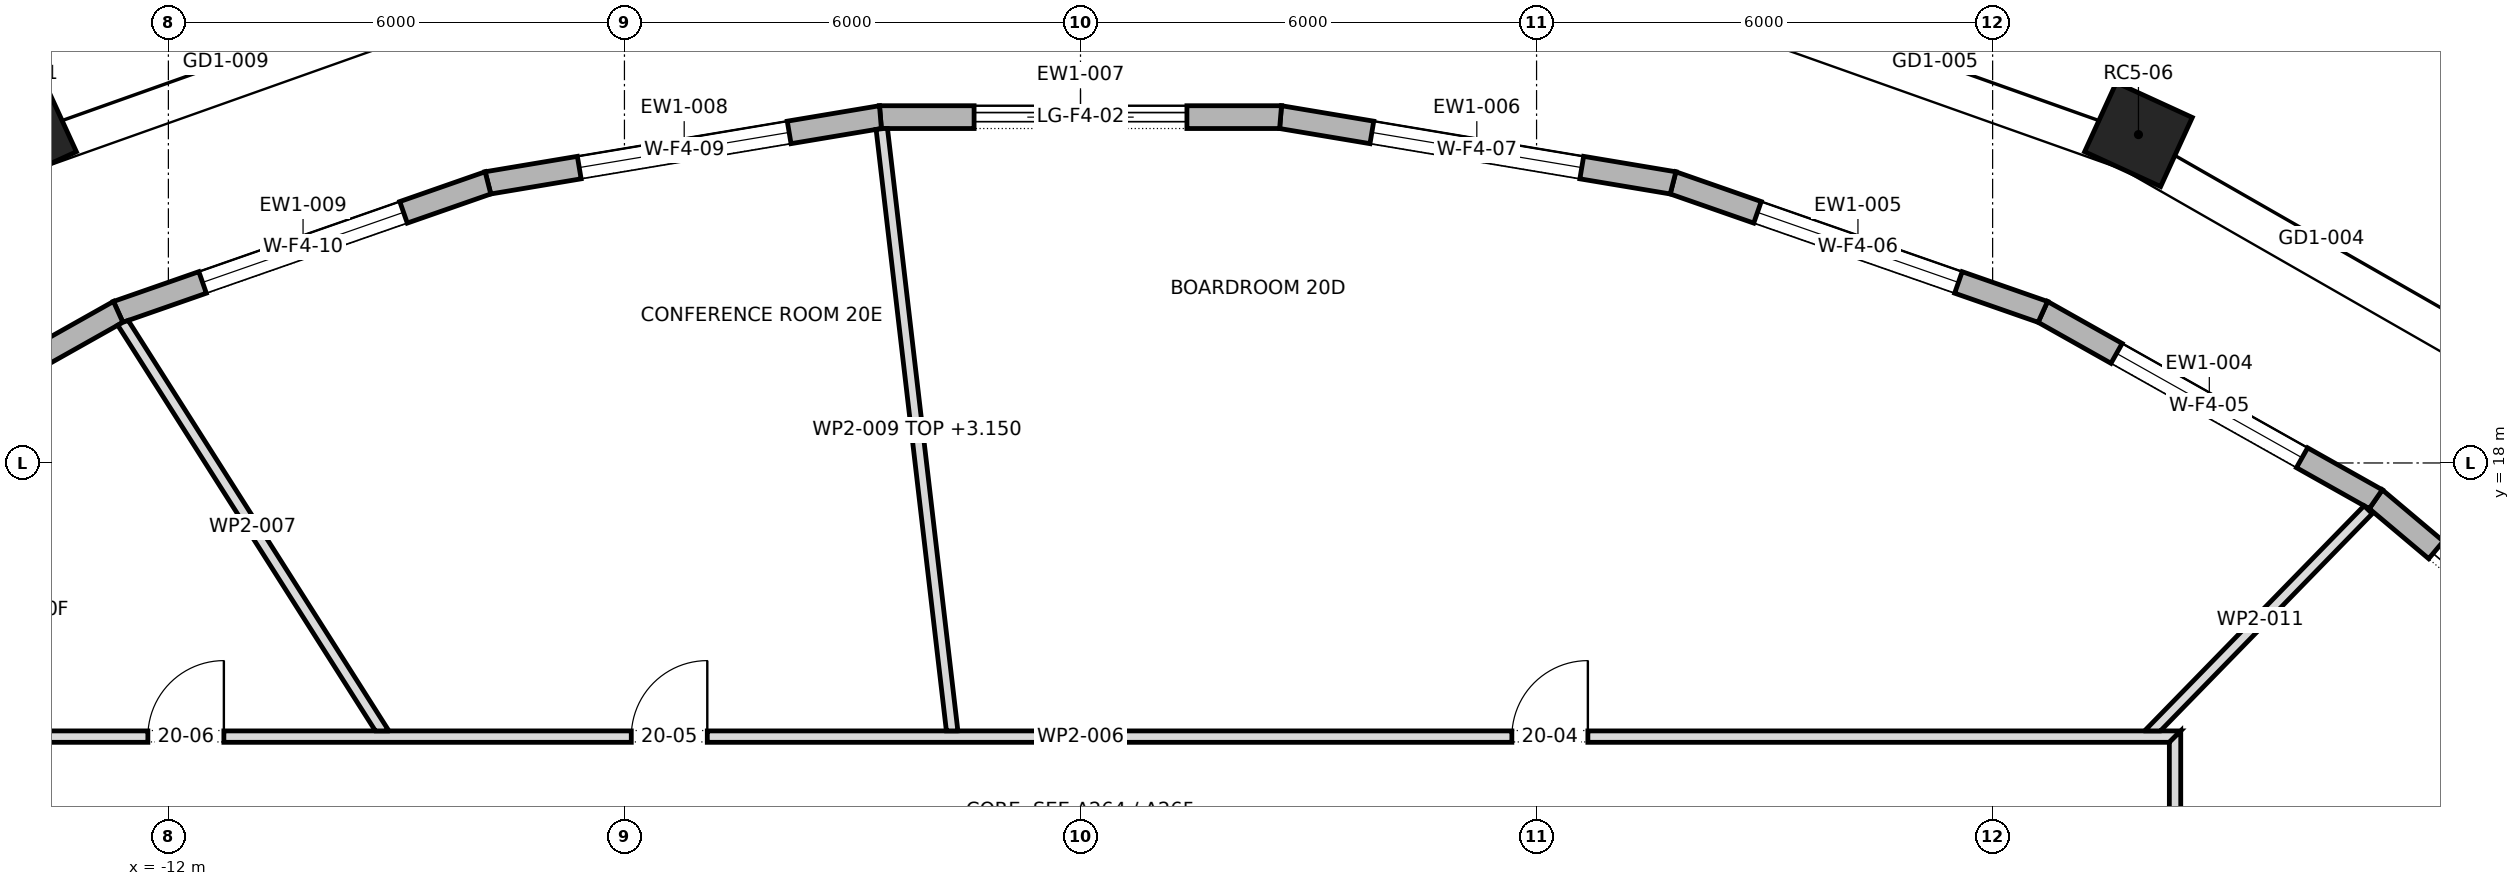
"""IFC4 building model, lengths in metres.
Left out: names, types, materials, properties, quantities, classifications, styles, units other than length and angle.
Written with IfcOpenShell. Run it as: python <this file> out.ifc"""

import sys

from ifc_helpers import new_model, si_unit, direction, frame, frame_2d, origin, origin_2d, place, context, subcontext, project, spatial, polyline, rectangle, outline, extrude, element, fill, save


model = new_model("IFC4")
c1 = context("Model", 3, precision=1e-05, world=origin(), true_north=direction((0.0, 1.0)))
c2 = subcontext(c1, "Body", "Model", "MODEL_VIEW")
j1 = project(units=[si_unit("LENGTHUNIT", "METRE"), si_unit("PLANEANGLEUNIT", "RADIAN")], contexts=[c1])
p1 = place(None, origin())
s1 = spatial("IfcSite", under=j1, at=p1, CompositionType="ELEMENT")
p2 = place(p1, origin())
s2 = spatial("IfcBuilding", under=s1, at=p2, CompositionType="ELEMENT")
p3 = place(p2, frame((0.0, 0.0, 280.3)))
s3 = spatial("IfcBuildingStorey", under=s2, at=p3, CompositionType="ELEMENT", Elevation=280.3)
for number, where, z_axis, x_axis in (
    (1, (13.919, 22.32, 0.0), (0.0, 0.0, 1.0), (-0.909, 0.417, 0.0)),
    (2, (-13.919, 22.32, 0.0), (0.0, 0.0, 1.0), (-0.909, -0.417, 0.0)),
):
    element("IfcColumn", number, at=place(p3, frame(where, z_axis=z_axis, x_axis=x_axis)), inside=s3, PredefinedType="COLUMN", context=c2, shape_type="SweptSolid", body=[
        extrude(rectangle(XDim=1.1, YDim=1.0, at=origin_2d()), origin(), (0.0, 0.0, 1.0), 4.0),
    ])
p4 = place(p3, frame((20.768, 14.384, 0.0), z_axis=(0.0, 0.0, 1.0), x_axis=(-0.764876116592, 0.644177402792, 0.0)))
e3 = element("IfcWall", 3, at=p4, inside=s3, PredefinedType="STANDARD", context=c2, shape_type="SweptSolid", body=[
    extrude(outline(polyline([(-0.015, -0.15), (4.887, -0.15), (4.859, 0.15), (0.015, 0.15), (-0.015, -0.15)])), origin(), (0.0, 0.0, 1.0), 3.7),
])
p5 = place(p4, frame((1.036, 0.0, 0.0)))
e4 = element("IfcOpeningElement", 4, at=p5, cuts=e3, PredefinedType="OPENING", context=c2, shape_type="SweptSolid", body=[
    extrude(rectangle(XDim=2.8, YDim=3.25, at=frame_2d((1.4, 1.625))), frame((0.0, 0.162, 0.0), z_axis=(0.0, -1.0, 0.0), x_axis=(1.0, 0.0, 0.0)), (0.0, 0.0, 1.0), 0.324),
])
p6 = place(p3, frame((17.041, 17.523, 0.0), z_axis=(0.0, 0.0, 1.0), x_axis=(-0.871488606878, 0.490415750239, 0.0)))
e5 = element("IfcWall", 5, at=p6, inside=s3, PredefinedType="STANDARD", context=c2, shape_type="SweptSolid", body=[
    extrude(outline(polyline([(-0.014, -0.15), (5.039, -0.15), (5.013, 0.15), (0.014, 0.15), (-0.014, -0.15)])), origin(), (0.0, 0.0, 1.0), 3.7),
])
p7 = place(p6, frame((1.113, 0.0, 0.6)))
e6 = element("IfcOpeningElement", 6, at=p7, cuts=e5, PredefinedType="OPENING", context=c2, shape_type="SweptSolid", body=[
    extrude(rectangle(XDim=2.8, YDim=2.65, at=frame_2d((1.4, 1.325))), frame((0.0, 0.162, 0.0), z_axis=(0.0, -1.0, 0.0), x_axis=(1.0, 0.0, 0.0)), (0.0, 0.0, 1.0), 0.324),
])
p8 = place(p3, frame((12.661, 19.988, 0.0), z_axis=(0.0, 0.0, 1.0), x_axis=(-0.944204293701, 0.329360367617, 0.0)))
e7 = element("IfcWall", 7, at=p8, inside=s3, PredefinedType="STANDARD", context=c2, shape_type="SweptSolid", body=[
    extrude(outline(polyline([(-0.013, -0.15), (5.165, -0.15), (5.14, 0.15), (0.013, 0.15), (-0.013, -0.15)])), origin(), (0.0, 0.0, 1.0), 3.7),
])
p9 = place(p8, frame((1.176, 0.0, 0.6)))
e8 = element("IfcOpeningElement", 8, at=p9, cuts=e7, PredefinedType="OPENING", context=c2, shape_type="SweptSolid", body=[
    extrude(rectangle(XDim=2.8, YDim=2.65, at=frame_2d((1.4, 1.325))), frame((0.0, 0.162, 0.0), z_axis=(0.0, -1.0, 0.0), x_axis=(1.0, 0.0, 0.0)), (0.0, 0.0, 1.0), 0.324),
])
p10 = place(p3, frame((7.796, 21.685, 0.0), z_axis=(0.0, 0.0, 1.0), x_axis=(-0.986257472007, 0.165215613396, 0.0)))
e9 = element("IfcWall", 9, at=p10, inside=s3, PredefinedType="STANDARD", context=c2, shape_type="SweptSolid", body=[
    extrude(outline(polyline([(-0.013, -0.15), (5.248, -0.15), (5.223, 0.15), (0.013, 0.15), (-0.013, -0.15)])), origin(), (0.0, 0.0, 1.0), 3.7),
])
p11 = place(p10, frame((1.218, 0.0, 0.6)))
e10 = element("IfcOpeningElement", 10, at=p11, cuts=e9, PredefinedType="OPENING", context=c2, shape_type="SweptSolid", body=[
    extrude(rectangle(XDim=2.8, YDim=2.65, at=frame_2d((1.4, 1.325))), frame((0.0, 0.162, 0.0), z_axis=(0.0, -1.0, 0.0), x_axis=(1.0, 0.0, 0.0)), (0.0, 0.0, 1.0), 0.324),
])
p12 = place(p3, frame((2.632, 22.55, 0.0), z_axis=(0.0, 0.0, 1.0), x_axis=(-1.0, 0.0, 0.0)))
e11 = element("IfcWall", 11, at=p12, inside=s3, PredefinedType="STANDARD", context=c2, shape_type="SweptSolid", body=[
    extrude(outline(polyline([(-0.012, -0.15), (5.277, -0.15), (5.252, 0.15), (0.012, 0.15), (-0.012, -0.15)])), origin(), (0.0, 0.0, 1.0), 3.7),
])
p13 = place(p12, frame((1.232, 0.0, 0.0)))
e12 = element("IfcOpeningElement", 12, at=p13, cuts=e11, PredefinedType="OPENING", context=c2, shape_type="SweptSolid", body=[
    extrude(rectangle(XDim=2.8, YDim=3.25, at=frame_2d((1.4, 1.625))), frame((0.0, 0.162, 0.0), z_axis=(0.0, -1.0, 0.0), x_axis=(1.0, 0.0, 0.0)), (0.0, 0.0, 1.0), 0.324),
])
p14 = place(p3, frame((-2.632, 22.55, 0.0), z_axis=(0.0, 0.0, 1.0), x_axis=(-0.986257472007, -0.165215613396, 0.0)))
e13 = element("IfcWall", 13, at=p14, inside=s3, PredefinedType="STANDARD", context=c2, shape_type="SweptSolid", body=[
    extrude(outline(polyline([(-0.012, -0.15), (5.248, -0.15), (5.223, 0.15), (0.012, 0.15), (-0.012, -0.15)])), origin(), (0.0, 0.0, 1.0), 3.7),
])
p15 = place(p14, frame((1.218, 0.0, 0.6)))
e14 = element("IfcOpeningElement", 14, at=p15, cuts=e13, PredefinedType="OPENING", context=c2, shape_type="SweptSolid", body=[
    extrude(rectangle(XDim=2.8, YDim=2.65, at=frame_2d((1.4, 1.325))), frame((0.0, 0.162, 0.0), z_axis=(0.0, -1.0, 0.0), x_axis=(1.0, 0.0, 0.0)), (0.0, 0.0, 1.0), 0.324),
])
p16 = place(p3, frame((-7.796, 21.685, 0.0), z_axis=(0.0, 0.0, 1.0), x_axis=(-0.944204293701, -0.329360367617, 0.0)))
e15 = element("IfcWall", 15, at=p16, inside=s3, PredefinedType="STANDARD", context=c2, shape_type="SweptSolid", body=[
    extrude(outline(polyline([(-0.013, -0.15), (5.166, -0.15), (5.139, 0.15), (0.013, 0.15), (-0.013, -0.15)])), origin(), (0.0, 0.0, 1.0), 3.7),
])
p17 = place(p16, frame((1.176, 0.0, 0.6)))
e16 = element("IfcOpeningElement", 16, at=p17, cuts=e15, PredefinedType="OPENING", context=c2, shape_type="SweptSolid", body=[
    extrude(rectangle(XDim=2.8, YDim=2.65, at=frame_2d((1.4, 1.325))), frame((0.0, 0.162, 0.0), z_axis=(0.0, -1.0, 0.0), x_axis=(1.0, 0.0, 0.0)), (0.0, 0.0, 1.0), 0.324),
])
p18 = place(p3, frame((-12.661, 19.988, 0.0), z_axis=(0.0, 0.0, 1.0), x_axis=(-0.871488606878, -0.490415750239, 0.0)))
e17 = element("IfcWall", 17, at=p18, inside=s3, PredefinedType="STANDARD", context=c2, shape_type="SweptSolid", body=[
    extrude(outline(polyline([(-0.013, -0.15), (5.04, -0.15), (5.012, 0.15), (0.013, 0.15), (-0.013, -0.15)])), origin(), (0.0, 0.0, 1.0), 3.7),
])
p19 = place(p18, frame((1.113, 0.0, 0.6)))
e18 = element("IfcOpeningElement", 18, at=p19, cuts=e17, PredefinedType="OPENING", context=c2, shape_type="SweptSolid", body=[
    extrude(rectangle(XDim=2.8, YDim=2.65, at=frame_2d((1.4, 1.325))), frame((0.0, 0.162, 0.0), z_axis=(0.0, -1.0, 0.0), x_axis=(1.0, 0.0, 0.0)), (0.0, 0.0, 1.0), 0.324),
])
p20 = place(p3, frame((-14.475, 14.4, 0.0), z_axis=(0.0, 0.0, 1.0), x_axis=(1.0, 0.0, 0.0)))
e19 = element("IfcWall", 19, at=p20, inside=s3, PredefinedType="PARTITIONING", context=c2, shape_type="SweptSolid", body=[
    extrude(outline(polyline([(0.15, -0.075), (2.06, -0.075), (3.97, -0.075), (5.88, -0.075), (7.79, -0.075), (9.7, -0.075), (11.61, -0.075), (13.52, -0.075), (15.43, -0.075), (17.34, -0.075), (19.25, -0.075), (21.16, -0.075), (23.07, -0.075), (24.98, -0.075), (26.89, -0.075), (28.8, -0.075), (28.95, 0.075), (27.02, 0.075), (25.09, 0.075), (23.16, 0.075), (21.23, 0.075), (19.3, 0.075), (17.37, 0.075), (15.44, 0.075), (13.51, 0.075), (11.58, 0.075), (9.65, 0.075), (7.72, 0.075), (5.79, 0.075), (3.86, 0.075), (1.93, 0.075), (0.0, 0.075), (0.15, -0.075)])), origin(), (0.0, 0.0, 1.0), 3.7),
])
p21 = place(p20, frame((20.15, 0.0, 0.0)))
e20 = element("IfcOpeningElement", 20, at=p21, cuts=e19, PredefinedType="OPENING", context=c2, shape_type="SweptSolid", body=[
    extrude(rectangle(XDim=1.0, YDim=2.1, at=frame_2d((0.5, 1.05))), frame((0.0, 0.087, 0.0), z_axis=(0.0, -1.0, 0.0), x_axis=(1.0, 0.0, 0.0)), (0.0, 0.0, 1.0), 0.174),
])
p22 = place(p20, frame((8.565, 0.0, 0.0)))
e21 = element("IfcOpeningElement", 21, at=p22, cuts=e19, PredefinedType="OPENING", context=c2, shape_type="SweptSolid", body=[
    extrude(rectangle(XDim=1.0, YDim=2.1, at=frame_2d((0.5, 1.05))), frame((0.0, 0.087, 0.0), z_axis=(0.0, -1.0, 0.0), x_axis=(1.0, 0.0, 0.0)), (0.0, 0.0, 1.0), 0.174),
])
p23 = place(p20, frame((2.205, 0.0, 0.0)))
e22 = element("IfcOpeningElement", 22, at=p23, cuts=e19, PredefinedType="OPENING", context=c2, shape_type="SweptSolid", body=[
    extrude(rectangle(XDim=1.0, YDim=2.1, at=frame_2d((0.5, 1.05))), frame((0.0, 0.087, 0.0), z_axis=(0.0, -1.0, 0.0), x_axis=(1.0, 0.0, 0.0)), (0.0, 0.0, 1.0), 0.174),
])
p24 = place(p3, frame((-9.162, 14.435, 0.0), z_axis=(0.0, 0.0, 1.0), x_axis=(-0.536136809147, 0.844131104674, 0.0)))
e23 = element("IfcWall", 23, at=p24, inside=s3, PredefinedType="PARTITIONING", context=c2, shape_type="SweptSolid", body=[
    extrude(outline(polyline([(0.0, -0.075), (1.599, -0.075), (3.198, -0.075), (4.798, -0.075), (6.397, -0.075), (6.414, -0.002), (6.417, 0.066), (6.417, 0.075), (4.837, 0.075), (3.256, 0.075), (1.676, 0.075), (0.095, 0.075), (0.0, -0.074), (0.0, -0.075)])), origin(), (0.0, 0.0, 1.0), 3.7),
])
p25 = place(p3, frame((-1.688, 14.467, 0.0), z_axis=(0.0, 0.0, 1.0), x_axis=(-0.116071250105, 0.993240889663, 0.0)))
e24 = element("IfcWall", 24, at=p25, inside=s3, PredefinedType="PARTITIONING", context=c2, shape_type="SweptSolid", body=[
    extrude(outline(polyline([(0.0, -0.075), (1.995, -0.075), (3.989, -0.075), (5.984, -0.075), (7.979, -0.075), (7.984, -0.025), (7.984, 0.075), (5.993, 0.075), (4.001, 0.075), (2.009, 0.075), (0.017, 0.075), (0.0, -0.073), (0.0, -0.075)])), origin(), (0.0, 0.0, 1.0), 3.15),
])
p26 = place(p3, frame((14.052, 14.423, 0.0), z_axis=(0.0, 0.0, 1.0), x_axis=(0.698170464683, 0.715931562542, 0.0)))
e25 = element("IfcWall", 25, at=p26, inside=s3, PredefinedType="PARTITIONING", context=c2, shape_type="SweptSolid", body=[
    extrude(outline(polyline([(4.137, -0.075), (4.137, 0.075), (4.137, 0.075), (2.758, 0.075), (1.379, 0.075), (0.0, 0.075), (0.0, 0.075), (0.146, -0.075), (2.142, -0.075), (4.137, -0.075)])), origin(), (0.0, 0.0, 1.0), 3.7),
])
p27 = place(p3, frame((14.4, -14.475, 0.0), z_axis=(0.0, 0.0, 1.0), x_axis=(0.0, 1.0, 0.0)))
e26 = element("IfcWall", 26, at=p27, inside=s3, PredefinedType="PARTITIONING", context=c2, shape_type="SweptSolid", body=[
    extrude(outline(polyline([(0.0, -0.075), (1.93, -0.075), (3.86, -0.075), (5.79, -0.075), (7.72, -0.075), (9.65, -0.075), (11.58, -0.075), (13.51, -0.075), (15.44, -0.075), (17.37, -0.075), (19.3, -0.075), (21.23, -0.075), (23.16, -0.075), (25.09, -0.075), (27.02, -0.075), (28.95, -0.075), (28.8, 0.075), (26.89, 0.075), (24.98, 0.075), (23.07, 0.075), (21.16, 0.075), (19.25, 0.075), (17.34, 0.075), (15.43, 0.075), (13.52, 0.075), (11.61, 0.075), (9.7, 0.075), (7.79, 0.075), (5.88, 0.075), (3.97, 0.075), (2.06, 0.075), (0.15, 0.075), (0.0, -0.075)])), origin(), (0.0, 0.0, 1.0), 3.7),
])
p28 = place(p27, frame((3.535, 0.0, 0.0)))
e27 = element("IfcOpeningElement", 27, at=p28, cuts=e26, PredefinedType="OPENING", context=c2, shape_type="SweptSolid", body=[
    extrude(rectangle(XDim=1.0, YDim=2.1, at=frame_2d((0.5, 1.05))), frame((0.0, 0.087, 0.0), z_axis=(0.0, -1.0, 0.0), x_axis=(1.0, 0.0, 0.0)), (0.0, 0.0, 1.0), 0.174),
])
p29 = place(p27, frame((10.14, 0.0, 0.0)))
e28 = element("IfcOpeningElement", 28, at=p29, cuts=e26, PredefinedType="OPENING", context=c2, shape_type="SweptSolid", body=[
    extrude(rectangle(XDim=1.0, YDim=2.1, at=frame_2d((0.5, 1.05))), frame((0.0, 0.087, 0.0), z_axis=(0.0, -1.0, 0.0), x_axis=(1.0, 0.0, 0.0)), (0.0, 0.0, 1.0), 0.174),
])
p30 = place(p27, frame((20.18, 0.0, 0.0)))
e29 = element("IfcOpeningElement", 29, at=p30, cuts=e26, PredefinedType="OPENING", context=c2, shape_type="SweptSolid", body=[
    extrude(rectangle(XDim=1.8, YDim=2.1, at=frame_2d((0.9, 1.05))), frame((0.0, 0.087, 0.0), z_axis=(0.0, -1.0, 0.0), x_axis=(1.0, 0.0, 0.0)), (0.0, 0.0, 1.0), 0.174),
])
p31 = place(p5, origin())
e30 = element("IfcDoor", 30, at=p31, inside=s3, OperationType="DOUBLE_DOOR_SLIDING", PredefinedType="DOOR", context=c2, shape_type="SweptSolid", body=[
    extrude(rectangle(XDim=2.8, YDim=3.25, at=frame_2d((1.4, 1.625))), frame((0.0, 0.025, 0.0), z_axis=(0.0, -1.0, 0.0), x_axis=(1.0, 0.0, 0.0)), (0.0, 0.0, 1.0), 0.05),
])
fill(e4, e30)
p32 = place(p7, origin())
e31 = element("IfcWindow", 31, at=p32, inside=s3, PartitioningType="DOUBLE_PANEL_VERTICAL", PredefinedType="WINDOW", context=c2, shape_type="SweptSolid", body=[
    extrude(rectangle(XDim=2.8, YDim=2.65, at=frame_2d((1.4, 1.325))), frame((0.0, 0.03, 0.0), z_axis=(0.0, -1.0, 0.0), x_axis=(1.0, 0.0, 0.0)), (0.0, 0.0, 1.0), 0.06),
])
fill(e6, e31)
p33 = place(p9, origin())
e32 = element("IfcWindow", 32, at=p33, inside=s3, PartitioningType="DOUBLE_PANEL_VERTICAL", PredefinedType="WINDOW", context=c2, shape_type="SweptSolid", body=[
    extrude(rectangle(XDim=2.8, YDim=2.65, at=frame_2d((1.4, 1.325))), frame((0.0, 0.03, 0.0), z_axis=(0.0, -1.0, 0.0), x_axis=(1.0, 0.0, 0.0)), (0.0, 0.0, 1.0), 0.06),
])
fill(e8, e32)
p34 = place(p11, origin())
e33 = element("IfcWindow", 33, at=p34, inside=s3, PartitioningType="DOUBLE_PANEL_VERTICAL", PredefinedType="WINDOW", context=c2, shape_type="SweptSolid", body=[
    extrude(rectangle(XDim=2.8, YDim=2.65, at=frame_2d((1.4, 1.325))), frame((0.0, 0.03, 0.0), z_axis=(0.0, -1.0, 0.0), x_axis=(1.0, 0.0, 0.0)), (0.0, 0.0, 1.0), 0.06),
])
fill(e10, e33)
p35 = place(p13, origin())
e34 = element("IfcDoor", 34, at=p35, inside=s3, OperationType="DOUBLE_DOOR_SLIDING", PredefinedType="DOOR", context=c2, shape_type="SweptSolid", body=[
    extrude(rectangle(XDim=2.8, YDim=3.25, at=frame_2d((1.4, 1.625))), frame((0.0, 0.025, 0.0), z_axis=(0.0, -1.0, 0.0), x_axis=(1.0, 0.0, 0.0)), (0.0, 0.0, 1.0), 0.05),
])
fill(e12, e34)
p36 = place(p15, origin())
e35 = element("IfcWindow", 35, at=p36, inside=s3, PartitioningType="DOUBLE_PANEL_VERTICAL", PredefinedType="WINDOW", context=c2, shape_type="SweptSolid", body=[
    extrude(rectangle(XDim=2.8, YDim=2.65, at=frame_2d((1.4, 1.325))), frame((0.0, 0.03, 0.0), z_axis=(0.0, -1.0, 0.0), x_axis=(1.0, 0.0, 0.0)), (0.0, 0.0, 1.0), 0.06),
])
fill(e14, e35)
p37 = place(p17, origin())
e36 = element("IfcWindow", 36, at=p37, inside=s3, PartitioningType="DOUBLE_PANEL_VERTICAL", PredefinedType="WINDOW", context=c2, shape_type="SweptSolid", body=[
    extrude(rectangle(XDim=2.8, YDim=2.65, at=frame_2d((1.4, 1.325))), frame((0.0, 0.03, 0.0), z_axis=(0.0, -1.0, 0.0), x_axis=(1.0, 0.0, 0.0)), (0.0, 0.0, 1.0), 0.06),
])
fill(e16, e36)
p38 = place(p21, origin())
e37 = element("IfcDoor", 37, at=p38, inside=s3, OperationType="SINGLE_SWING_LEFT", PredefinedType="DOOR", context=c2, shape_type="SweptSolid", body=[
    extrude(rectangle(XDim=1.0, YDim=2.1, at=frame_2d((0.5, 1.05))), frame((0.0, 0.025, 0.0), z_axis=(0.0, -1.0, 0.0), x_axis=(1.0, 0.0, 0.0)), (0.0, 0.0, 1.0), 0.05),
])
fill(e20, e37)
p39 = place(p22, origin())
e38 = element("IfcDoor", 38, at=p39, inside=s3, OperationType="SINGLE_SWING_LEFT", PredefinedType="DOOR", context=c2, shape_type="SweptSolid", body=[
    extrude(rectangle(XDim=1.0, YDim=2.1, at=frame_2d((0.5, 1.05))), frame((0.0, 0.025, 0.0), z_axis=(0.0, -1.0, 0.0), x_axis=(1.0, 0.0, 0.0)), (0.0, 0.0, 1.0), 0.05),
])
fill(e21, e38)
p40 = place(p23, origin())
e39 = element("IfcDoor", 39, at=p40, inside=s3, OperationType="SINGLE_SWING_LEFT", PredefinedType="DOOR", context=c2, shape_type="SweptSolid", body=[
    extrude(rectangle(XDim=1.0, YDim=2.1, at=frame_2d((0.5, 1.05))), frame((0.0, 0.025, 0.0), z_axis=(0.0, -1.0, 0.0), x_axis=(1.0, 0.0, 0.0)), (0.0, 0.0, 1.0), 0.05),
])
fill(e22, e39)
save(model, sys.argv[1])
